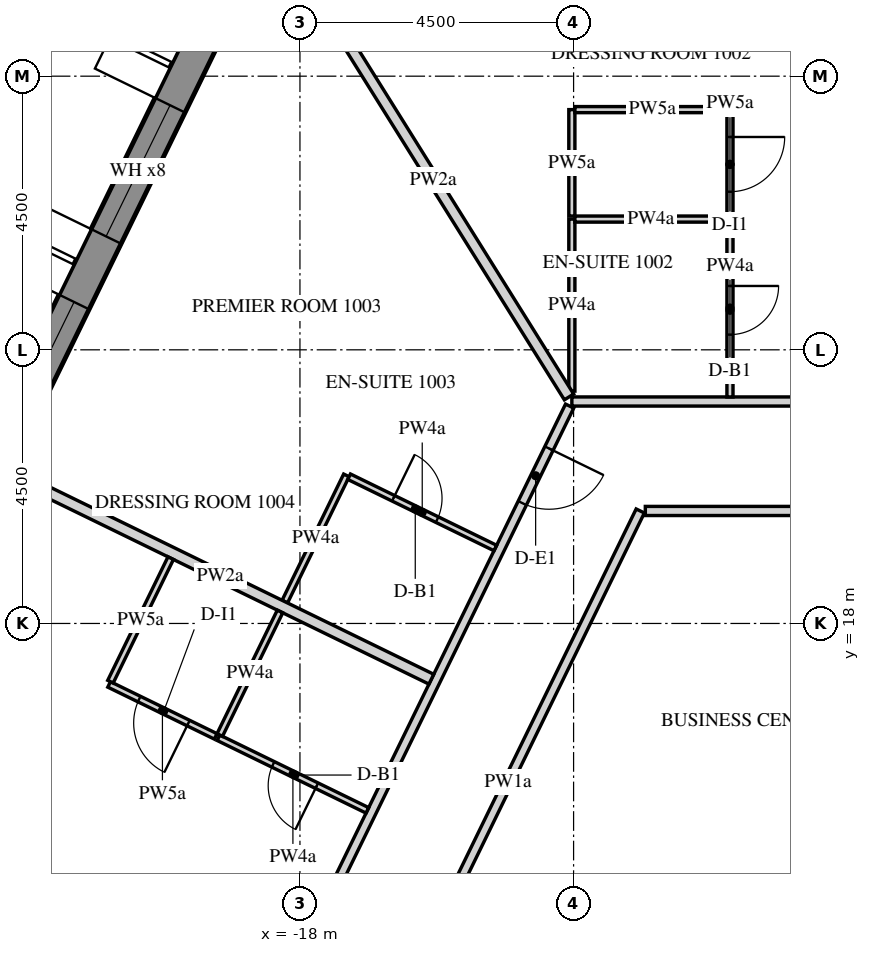
"""IFC4 building model, lengths in metres.
Left out: names, types, materials, properties, quantities, classifications, styles, units other than length and angle.
Written with IfcOpenShell. Run it as: python <this file> out.ifc"""

import sys

from ifc_helpers import new_model, si_unit, direction, frame, frame_2d, origin, place, context, subcontext, project, spatial, polyline, rectangle, outline, extrude, element, fill, save


model = new_model("IFC4")
c1 = context("Model", 3, precision=1e-05, world=origin(), true_north=direction((0.0, 1.0)))
c2 = subcontext(c1, "Body", "Model", "MODEL_VIEW")
j1 = project(units=[si_unit("LENGTHUNIT", "METRE"), si_unit("PLANEANGLEUNIT", "RADIAN")], contexts=[c1])
p1 = place(None, origin())
s1 = spatial("IfcSite", under=j1, at=p1, CompositionType="ELEMENT")
p2 = place(p1, origin())
s2 = spatial("IfcBuilding", under=s1, at=p2, CompositionType="ELEMENT")
p3 = place(p2, frame((0.0, 0.0, 135.0)))
s3 = spatial("IfcBuildingStorey", under=s2, at=p3, CompositionType="ELEMENT", Elevation=135.0)
p4 = place(p3, frame((-19.595, 27.633, -0.15), z_axis=(0.0, 0.0, 1.0), x_axis=(-0.438368285794, -0.898795441694, 0.0)))
e1 = element("IfcWall", 1, at=p4, inside=s3, PredefinedType="SOLIDWALL", context=c2, shape_type="SweptSolid", body=[
    extrude(outline(polyline([(-0.026, -0.275), (30.093, -0.275), (30.048, 0.275), (0.026, 0.275), (-0.026, -0.275)])), origin(), (0.0, 0.0, 1.0), 3.9),
])
p5 = place(p4, frame((1.236, 0.0, 1.05)))
e2 = element("IfcOpeningElement", 2, at=p5, cuts=e1, PredefinedType="OPENING", context=c2, shape_type="SweptSolid", body=[
    extrude(rectangle(XDim=2.4, YDim=2.4, at=frame_2d((1.2, 1.2))), frame((0.0, 0.285, 0.0), z_axis=(0.0, -1.0, 0.0), x_axis=(1.0, 0.0, 0.0)), (0.0, 0.0, 1.0), 0.57),
])
p6 = place(p4, frame((4.835, 0.0, 1.05)))
e3 = element("IfcOpeningElement", 3, at=p6, cuts=e1, PredefinedType="OPENING", context=c2, shape_type="SweptSolid", body=[
    extrude(rectangle(XDim=2.4, YDim=2.4, at=frame_2d((1.2, 1.2))), frame((0.0, 0.285, 0.0), z_axis=(0.0, -1.0, 0.0), x_axis=(1.0, 0.0, 0.0)), (0.0, 0.0, 1.0), 0.57),
])
p7 = place(p4, frame((8.436, 0.0, 1.05)))
e4 = element("IfcOpeningElement", 4, at=p7, cuts=e1, PredefinedType="OPENING", context=c2, shape_type="SweptSolid", body=[
    extrude(rectangle(XDim=2.4, YDim=2.4, at=frame_2d((1.2, 1.2))), frame((0.0, 0.285, 0.0), z_axis=(0.0, -1.0, 0.0), x_axis=(1.0, 0.0, 0.0)), (0.0, 0.0, 1.0), 0.57),
])
p8 = place(p4, frame((12.035, 0.0, 1.05)))
e5 = element("IfcOpeningElement", 5, at=p8, cuts=e1, PredefinedType="OPENING", context=c2, shape_type="SweptSolid", body=[
    extrude(rectangle(XDim=2.4, YDim=2.4, at=frame_2d((1.2, 1.2))), frame((0.0, 0.285, 0.0), z_axis=(0.0, -1.0, 0.0), x_axis=(1.0, 0.0, 0.0)), (0.0, 0.0, 1.0), 0.57),
])
p9 = place(p4, frame((15.635, 0.0, 1.05)))
e6 = element("IfcOpeningElement", 6, at=p9, cuts=e1, PredefinedType="OPENING", context=c2, shape_type="SweptSolid", body=[
    extrude(rectangle(XDim=2.4, YDim=2.4, at=frame_2d((1.2, 1.2))), frame((0.0, 0.285, 0.0), z_axis=(0.0, -1.0, 0.0), x_axis=(1.0, 0.0, 0.0)), (0.0, 0.0, 1.0), 0.57),
])
p10 = place(p4, frame((19.236, 0.0, 1.05)))
e7 = element("IfcOpeningElement", 7, at=p10, cuts=e1, PredefinedType="OPENING", context=c2, shape_type="SweptSolid", body=[
    extrude(rectangle(XDim=2.4, YDim=2.4, at=frame_2d((1.2, 1.2))), frame((0.0, 0.285, 0.0), z_axis=(0.0, -1.0, 0.0), x_axis=(1.0, 0.0, 0.0)), (0.0, 0.0, 1.0), 0.57),
])
p11 = place(p4, frame((22.835, 0.0, 1.05)))
e8 = element("IfcOpeningElement", 8, at=p11, cuts=e1, PredefinedType="OPENING", context=c2, shape_type="SweptSolid", body=[
    extrude(rectangle(XDim=2.4, YDim=2.4, at=frame_2d((1.2, 1.2))), frame((0.0, 0.285, 0.0), z_axis=(0.0, -1.0, 0.0), x_axis=(1.0, 0.0, 0.0)), (0.0, 0.0, 1.0), 0.57),
])
p12 = place(p4, frame((26.436, 0.0, 1.05)))
e9 = element("IfcOpeningElement", 9, at=p12, cuts=e1, PredefinedType="OPENING", context=c2, shape_type="SweptSolid", body=[
    extrude(rectangle(XDim=2.4, YDim=2.4, at=frame_2d((1.2, 1.2))), frame((0.0, 0.285, 0.0), z_axis=(0.0, -1.0, 0.0), x_axis=(1.0, 0.0, 0.0)), (0.0, 0.0, 1.0), 0.57),
])
p13 = place(p3, frame((-7.91, 13.7, -0.15), z_axis=(0.0, 0.0, 1.0), x_axis=(-0.499999880136, -0.866025472988, 0.0)))
e10 = element("IfcWall", 10, at=p13, inside=s3, PredefinedType="SHEAR", context=c2, shape_type="SweptSolid", body=[
    extrude(outline(polyline([(-0.173, -0.3), (15.993, -0.3), (15.646, 0.3), (0.173, 0.3), (-0.173, -0.3)])), origin(), (0.0, 0.0, 1.0), 3.9),
])
p14 = place(p13, frame((7.039, 0.0, 0.15)))
e11 = element("IfcOpeningElement", 11, at=p14, cuts=e10, PredefinedType="OPENING", context=c2, shape_type="SweptSolid", body=[
    extrude(rectangle(XDim=1.8, YDim=2.4, at=frame_2d((0.9, 1.2))), frame((0.0, 0.31, 0.0), z_axis=(0.0, -1.0, 0.0), x_axis=(1.0, 0.0, 0.0)), (0.0, 0.0, 1.0), 0.62),
])
p15 = place(p3, frame((9.988, 21.65, 0.0), z_axis=(0.0, 0.0, 1.0), x_axis=(-1.0, 0.0, 0.0)))
e12 = element("IfcWall", 12, at=p15, inside=s3, PredefinedType="PARTITIONING", context=c2, shape_type="SweptSolid", body=[
    extrude(rectangle(XDim=23.516, YDim=0.15, at=frame_2d((11.758, 0.0))), origin(), (0.0, 0.0, 1.0), 2.838),
])
p16 = place(p15, frame((3.856, 0.0, 0.0)))
e13 = element("IfcOpeningElement", 13, at=p16, cuts=e12, PredefinedType="OPENING", context=c2, shape_type="SweptSolid", body=[
    extrude(rectangle(XDim=1.0, YDim=2.1, at=frame_2d((0.5, 1.05))), frame((0.0, 0.085, 0.0), z_axis=(0.0, -1.0, 0.0), x_axis=(1.0, 0.0, 0.0)), (0.0, 0.0, 1.0), 0.17),
])
p17 = place(p15, frame((15.558, 0.0, 0.0)))
e14 = element("IfcOpeningElement", 14, at=p17, cuts=e12, PredefinedType="OPENING", context=c2, shape_type="SweptSolid", body=[
    extrude(rectangle(XDim=1.0, YDim=2.1, at=frame_2d((0.5, 1.05))), frame((0.0, 0.085, 0.0), z_axis=(0.0, -1.0, 0.0), x_axis=(1.0, 0.0, 0.0)), (0.0, 0.0, 1.0), 0.17),
])
p18 = place(p3, frame((-13.565, 21.575, 0.0), z_axis=(0.0, 0.0, 1.0), x_axis=(-0.438378393111, -0.898790511996, 0.0)))
e15 = element("IfcWall", 15, at=p18, inside=s3, PredefinedType="PARTITIONING", context=c2, shape_type="SweptSolid", body=[
    extrude(rectangle(XDim=21.584, YDim=0.15, at=frame_2d((10.792, 0.0))), origin(), (0.0, 0.0, 1.0), 2.838),
])
p19 = place(p18, frame((0.775, 0.0, 0.0)))
e16 = element("IfcOpeningElement", 16, at=p19, cuts=e15, PredefinedType="OPENING", context=c2, shape_type="SweptSolid", body=[
    extrude(rectangle(XDim=1.0, YDim=2.1, at=frame_2d((0.5, 1.05))), frame((0.0, 0.085, 0.0), z_axis=(0.0, -1.0, 0.0), x_axis=(1.0, 0.0, 0.0)), (0.0, 0.0, 1.0), 0.17),
])
p20 = place(p18, frame((11.134, 0.0, 0.0)))
e17 = element("IfcOpeningElement", 17, at=p20, cuts=e15, PredefinedType="OPENING", context=c2, shape_type="SweptSolid", body=[
    extrude(rectangle(XDim=1.0, YDim=2.1, at=frame_2d((0.5, 1.05))), frame((0.0, 0.085, 0.0), z_axis=(0.0, -1.0, 0.0), x_axis=(1.0, 0.0, 0.0)), (0.0, 0.0, 1.0), 0.17),
])
p21 = place(p18, frame((16.801, 0.0, 0.0)))
e18 = element("IfcOpeningElement", 18, at=p21, cuts=e15, PredefinedType="OPENING", context=c2, shape_type="SweptSolid", body=[
    extrude(rectangle(XDim=1.0, YDim=2.1, at=frame_2d((0.5, 1.05))), frame((0.0, 0.085, 0.0), z_axis=(0.0, -1.0, 0.0), x_axis=(1.0, 0.0, 0.0)), (0.0, 0.0, 1.0), 0.17),
])
p22 = place(p3, frame((-16.751, 10.937, 0.0), z_axis=(0.0, 0.0, 1.0), x_axis=(0.438378523504, 0.898790448397, 0.0)))
e19 = element("IfcWall", 19, at=p22, inside=s3, PredefinedType="PARTITIONING", context=c2, shape_type="SweptSolid", body=[
    extrude(rectangle(XDim=9.917, YDim=0.15, at=frame_2d((4.958, 0.0))), origin(), (0.0, 0.0, 1.0), 2.838),
])
p23 = place(p3, frame((-12.32, 19.85, 0.0), z_axis=(0.0, 0.0, 1.0), x_axis=(1.0, 0.0, 0.0)))
e20 = element("IfcWall", 20, at=p23, inside=s3, PredefinedType="PARTITIONING", context=c2, shape_type="SweptSolid", body=[
    extrude(rectangle(XDim=11.57, YDim=0.15, at=frame_2d((5.785, 0.0))), origin(), (0.0, 0.0, 1.0), 2.838),
])
p24 = place(p23, frame((5.335, 0.0, 0.0)))
e21 = element("IfcOpeningElement", 21, at=p24, cuts=e20, PredefinedType="OPENING", context=c2, shape_type="SweptSolid", body=[
    extrude(rectangle(XDim=0.9, YDim=2.1, at=frame_2d((0.45, 1.05))), frame((0.0, 0.085, 0.0), z_axis=(0.0, -1.0, 0.0), x_axis=(1.0, 0.0, 0.0)), (0.0, 0.0, 1.0), 0.17),
])
p25 = place(p3, frame((-13.528, 21.821, 0.0), z_axis=(0.0, 0.0, 1.0), x_axis=(0.0, 1.0, 0.0)))
e22 = element("IfcWall", 22, at=p25, inside=s3, PredefinedType="PARTITIONING", context=c2, shape_type="SweptSolid", body=[
    extrude(rectangle(XDim=2.829, YDim=0.1, at=frame_2d((1.415, 0.0))), origin(), (0.0, 0.0, 1.0), 2.838),
])
p26 = place(p3, frame((-10.928, 24.65, 0.0), z_axis=(0.0, 0.0, 1.0), x_axis=(0.0, -1.0, 0.0)))
e23 = element("IfcWall", 23, at=p26, inside=s3, PredefinedType="PARTITIONING", context=c2, shape_type="SweptSolid", body=[
    extrude(rectangle(XDim=2.925, YDim=0.1, at=frame_2d((1.462, 0.0))), origin(), (0.0, 0.0, 1.0), 2.838),
])
p27 = place(p26, frame((1.1, 0.0, 0.0)))
e24 = element("IfcOpeningElement", 24, at=p27, cuts=e23, PredefinedType="OPENING", context=c2, shape_type="SweptSolid", body=[
    extrude(rectangle(XDim=0.8, YDim=2.1, at=frame_2d((0.4, 1.05))), frame((0.0, 0.06, 0.0), z_axis=(0.0, -1.0, 0.0), x_axis=(1.0, 0.0, 0.0)), (0.0, 0.0, 1.0), 0.12),
])
p28 = place(p3, frame((-13.528, 24.7, 0.0), z_axis=(0.0, 0.0, 1.0), x_axis=(0.0, 1.0, 0.0)))
e25 = element("IfcWall", 25, at=p28, inside=s3, PredefinedType="PARTITIONING", context=c2, shape_type="SweptSolid", body=[
    extrude(rectangle(XDim=1.75, YDim=0.1, at=frame_2d((0.875, 0.0))), origin(), (0.0, 0.0, 1.0), 2.838),
])
p29 = place(p3, frame((-13.479, 26.45, 0.0), z_axis=(0.0, 0.0, 1.0), x_axis=(1.0, 0.0, 0.0)))
e26 = element("IfcWall", 26, at=p29, inside=s3, PredefinedType="PARTITIONING", context=c2, shape_type="SweptSolid", body=[
    extrude(rectangle(XDim=2.55, YDim=0.1, at=frame_2d((1.275, 0.0))), origin(), (0.0, 0.0, 1.0), 2.838),
])
p30 = place(p3, frame((-10.928, 26.4, 0.0), z_axis=(0.0, 0.0, 1.0), x_axis=(0.0, -1.0, 0.0)))
e27 = element("IfcWall", 27, at=p30, inside=s3, PredefinedType="PARTITIONING", context=c2, shape_type="SweptSolid", body=[
    extrude(rectangle(XDim=1.7, YDim=0.1, at=frame_2d((0.85, 0.0))), origin(), (0.0, 0.0, 1.0), 2.838),
])
p31 = place(p30, frame((0.4, 0.0, 0.0)))
e28 = element("IfcOpeningElement", 28, at=p31, cuts=e27, PredefinedType="OPENING", context=c2, shape_type="SweptSolid", body=[
    extrude(rectangle(XDim=0.9, YDim=2.1, at=frame_2d((0.45, 1.05))), frame((0.0, 0.06, 0.0), z_axis=(0.0, -1.0, 0.0), x_axis=(1.0, 0.0, 0.0)), (0.0, 0.0, 1.0), 0.12),
])
p32 = place(p3, frame((-18.041, 28.871, 0.0), z_axis=(0.0, 0.0, 1.0), x_axis=(0.52994164425, -0.848034111159, 0.0)))
e29 = element("IfcWall", 29, at=p32, inside=s3, PredefinedType="PARTITIONING", context=c2, shape_type="SweptSolid", body=[
    extrude(rectangle(XDim=8.427, YDim=0.18, at=frame_2d((4.213, 0.0))), origin(), (0.0, 0.0, 1.0), 2.838),
])
p33 = place(p3, frame((-10.979, 24.65, 0.0), z_axis=(0.0, 0.0, 1.0), x_axis=(-1.0, 0.0, 0.0)))
e30 = element("IfcWall", 30, at=p33, inside=s3, PredefinedType="PARTITIONING", context=c2, shape_type="SweptSolid", body=[
    extrude(rectangle(XDim=2.5, YDim=0.1, at=frame_2d((1.25, 0.0))), origin(), (0.0, 0.0, 1.0), 2.838),
])
p34 = place(p3, frame((-18.249, 18.359, 0.0), z_axis=(0.0, 0.0, 1.0), x_axis=(0.438313261974, 0.898822276303, 0.0)))
e31 = element("IfcWall", 31, at=p34, inside=s3, PredefinedType="PARTITIONING", context=c2, shape_type="SweptSolid", body=[
    extrude(rectangle(XDim=2.31, YDim=0.1, at=frame_2d((1.155, 0.0))), origin(), (0.0, 0.0, 1.0), 2.838),
])
p35 = place(p3, frame((-17.191, 20.413, 0.0), z_axis=(0.0, 0.0, 1.0), x_axis=(0.898800897694, -0.438357099068, 0.0)))
e32 = element("IfcWall", 32, at=p35, inside=s3, PredefinedType="PARTITIONING", context=c2, shape_type="SweptSolid", body=[
    extrude(rectangle(XDim=2.675, YDim=0.1, at=frame_2d((1.337, 0.0))), origin(), (0.0, 0.0, 1.0), 2.838),
])
p36 = place(p35, frame((0.81, 0.0, 0.0)))
e33 = element("IfcOpeningElement", 33, at=p36, cuts=e32, PredefinedType="OPENING", context=c2, shape_type="SweptSolid", body=[
    extrude(rectangle(XDim=0.8, YDim=2.1, at=frame_2d((0.4, 1.05))), frame((0.0, 0.06, 0.0), z_axis=(0.0, -1.0, 0.0), x_axis=(1.0, 0.0, 0.0)), (0.0, 0.0, 1.0), 0.12),
])
p37 = place(p3, frame((-22.782, 20.47, 0.0), z_axis=(0.0, 0.0, 1.0), x_axis=(0.898789402655, -0.438380667542, 0.0)))
e34 = element("IfcWall", 34, at=p37, inside=s3, PredefinedType="PARTITIONING", context=c2, shape_type="SweptSolid", body=[
    extrude(rectangle(XDim=7.725, YDim=0.18, at=frame_2d((3.862, 0.0))), origin(), (0.0, 0.0, 1.0), 2.838),
])
p38 = place(p3, frame((-16.891, 14.926, 0.0), z_axis=(0.0, 0.0, 1.0), x_axis=(-0.898791692788, 0.43837597217, 0.0)))
e35 = element("IfcWall", 35, at=p38, inside=s3, PredefinedType="PARTITIONING", context=c2, shape_type="SweptSolid", body=[
    extrude(rectangle(XDim=2.725, YDim=0.1, at=frame_2d((1.363, 0.0))), origin(), (0.0, 0.0, 1.0), 2.838),
])
p39 = place(p38, frame((0.925, 0.0, 0.0)))
e36 = element("IfcOpeningElement", 36, at=p39, cuts=e35, PredefinedType="OPENING", context=c2, shape_type="SweptSolid", body=[
    extrude(rectangle(XDim=0.8, YDim=2.1, at=frame_2d((0.4, 1.05))), frame((0.0, 0.06, 0.0), z_axis=(0.0, -1.0, 0.0), x_axis=(1.0, 0.0, 0.0)), (0.0, 0.0, 1.0), 0.12),
])
p40 = place(p3, frame((-19.385, 16.143, 0.0), z_axis=(0.0, 0.0, 1.0), x_axis=(-0.898815368173, 0.438327427772, 0.0)))
e37 = element("IfcWall", 37, at=p40, inside=s3, PredefinedType="PARTITIONING", context=c2, shape_type="SweptSolid", body=[
    extrude(rectangle(XDim=1.95, YDim=0.1, at=frame_2d((0.975, 0.0))), origin(), (0.0, 0.0, 1.0), 2.838),
])
p41 = place(p40, frame((0.5, 0.0, 0.0)))
e38 = element("IfcOpeningElement", 38, at=p41, cuts=e37, PredefinedType="OPENING", context=c2, shape_type="SweptSolid", body=[
    extrude(rectangle(XDim=0.9, YDim=2.1, at=frame_2d((0.45, 1.05))), frame((0.0, 0.06, 0.0), z_axis=(0.0, -1.0, 0.0), x_axis=(1.0, 0.0, 0.0)), (0.0, 0.0, 1.0), 0.12),
])
p42 = place(p3, frame((-21.116, 17.042, 0.0), z_axis=(0.0, 0.0, 1.0), x_axis=(0.438334246956, 0.898812042613, 0.0)))
e39 = element("IfcWall", 39, at=p42, inside=s3, PredefinedType="PARTITIONING", context=c2, shape_type="SweptSolid", body=[
    extrude(rectangle(XDim=2.26, YDim=0.1, at=frame_2d((1.13, 0.0))), origin(), (0.0, 0.0, 1.0), 2.838),
])
p43 = place(p3, frame((-18.328, 18.197, 0.0), z_axis=(0.0, 0.0, 1.0), x_axis=(-0.438376807268, -0.898791285477, 0.0)))
e40 = element("IfcWall", 40, at=p43, inside=s3, PredefinedType="PARTITIONING", context=c2, shape_type="SweptSolid", body=[
    extrude(rectangle(XDim=2.26, YDim=0.1, at=frame_2d((1.13, 0.0))), origin(), (0.0, 0.0, 1.0), 2.838),
])
p44 = place(p5, frame((0.0, 0.205, 0.0)))
e41 = element("IfcWindow", 41, at=p44, inside=s3, PartitioningType="DOUBLE_PANEL_VERTICAL", PredefinedType="WINDOW", context=c2, shape_type="SweptSolid", body=[
    extrude(rectangle(XDim=2.4, YDim=2.4, at=frame_2d((1.2, 1.2))), frame((0.0, 0.03, 0.0), z_axis=(0.0, -1.0, 0.0), x_axis=(1.0, 0.0, 0.0)), (0.0, 0.0, 1.0), 0.06),
])
fill(e2, e41)
p45 = place(p6, frame((0.0, 0.205, 0.0)))
e42 = element("IfcWindow", 42, at=p45, inside=s3, PartitioningType="DOUBLE_PANEL_VERTICAL", PredefinedType="WINDOW", context=c2, shape_type="SweptSolid", body=[
    extrude(rectangle(XDim=2.4, YDim=2.4, at=frame_2d((1.2, 1.2))), frame((0.0, 0.03, 0.0), z_axis=(0.0, -1.0, 0.0), x_axis=(1.0, 0.0, 0.0)), (0.0, 0.0, 1.0), 0.06),
])
fill(e3, e42)
p46 = place(p27, origin())
e43 = element("IfcDoor", 43, at=p46, inside=s3, OperationType="SINGLE_SWING_LEFT", PredefinedType="DOOR", context=c2, shape_type="SweptSolid", body=[
    extrude(rectangle(XDim=0.8, YDim=2.1, at=frame_2d((0.4, 1.05))), frame((0.0, 0.025, 0.0), z_axis=(0.0, -1.0, 0.0), x_axis=(1.0, 0.0, 0.0)), (0.0, 0.0, 1.0), 0.05),
])
fill(e24, e43)
p47 = place(p31, origin())
e44 = element("IfcDoor", 44, at=p47, inside=s3, OperationType="SINGLE_SWING_RIGHT", PredefinedType="DOOR", context=c2, shape_type="SweptSolid", body=[
    extrude(rectangle(XDim=0.9, YDim=2.1, at=frame_2d((0.45, 1.05))), frame((0.0, 0.025, 0.0), z_axis=(0.0, -1.0, 0.0), x_axis=(1.0, 0.0, 0.0)), (0.0, 0.0, 1.0), 0.05),
])
fill(e28, e44)
p48 = place(p19, origin())
e45 = element("IfcDoor", 45, at=p48, inside=s3, OperationType="SINGLE_SWING_RIGHT", PredefinedType="DOOR", context=c2, shape_type="SweptSolid", body=[
    extrude(rectangle(XDim=1.0, YDim=2.1, at=frame_2d((0.5, 1.05))), frame((0.0, 0.025, 0.0), z_axis=(0.0, -1.0, 0.0), x_axis=(1.0, 0.0, 0.0)), (0.0, 0.0, 1.0), 0.05),
])
fill(e16, e45)
p49 = place(p36, origin())
e46 = element("IfcDoor", 46, at=p49, inside=s3, OperationType="SINGLE_SWING_RIGHT", PredefinedType="DOOR", context=c2, shape_type="SweptSolid", body=[
    extrude(rectangle(XDim=0.8, YDim=2.1, at=frame_2d((0.4, 1.05))), frame((0.0, 0.025, 0.0), z_axis=(0.0, -1.0, 0.0), x_axis=(1.0, 0.0, 0.0)), (0.0, 0.0, 1.0), 0.05),
])
fill(e33, e46)
p50 = place(p39, origin())
e47 = element("IfcDoor", 47, at=p50, inside=s3, OperationType="SINGLE_SWING_RIGHT", PredefinedType="DOOR", context=c2, shape_type="SweptSolid", body=[
    extrude(rectangle(XDim=0.8, YDim=2.1, at=frame_2d((0.4, 1.05))), frame((0.0, 0.025, 0.0), z_axis=(0.0, -1.0, 0.0), x_axis=(1.0, 0.0, 0.0)), (0.0, 0.0, 1.0), 0.05),
])
fill(e36, e47)
p51 = place(p41, origin())
e48 = element("IfcDoor", 48, at=p51, inside=s3, OperationType="SINGLE_SWING_LEFT", PredefinedType="DOOR", context=c2, shape_type="SweptSolid", body=[
    extrude(rectangle(XDim=0.9, YDim=2.1, at=frame_2d((0.45, 1.05))), frame((0.0, 0.025, 0.0), z_axis=(0.0, -1.0, 0.0), x_axis=(1.0, 0.0, 0.0)), (0.0, 0.0, 1.0), 0.05),
])
fill(e38, e48)
save(model, sys.argv[1])
